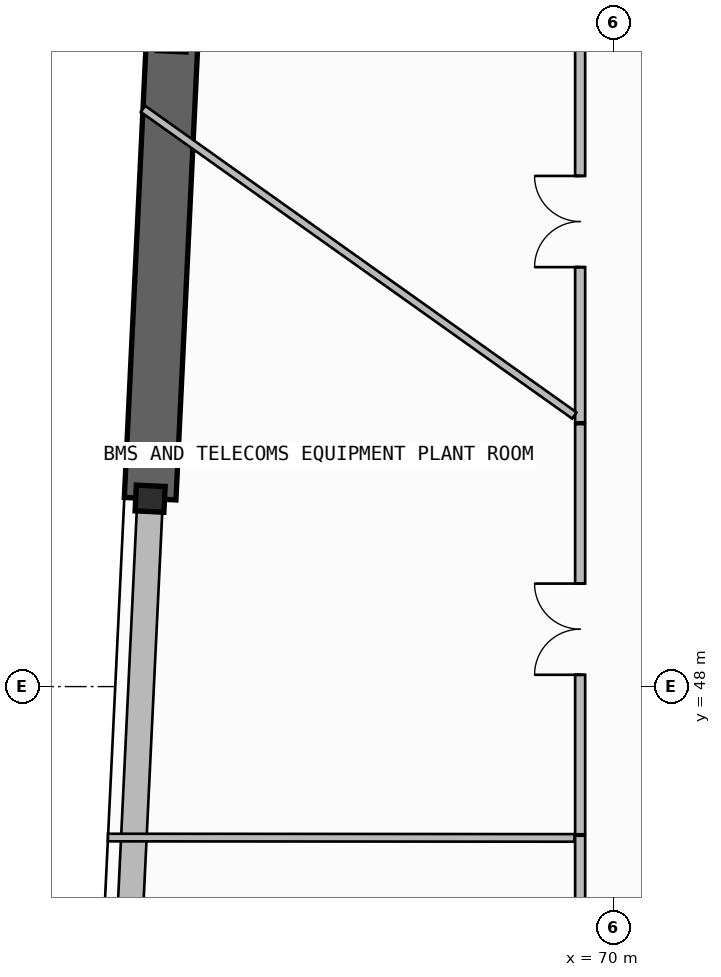
"""IFC4 building model, lengths in metres.
Left out: names, types, materials, properties, quantities, classifications, styles, units other than length and angle.
Written with IfcOpenShell. Run it as: python <this file> out.ifc"""

import sys

from ifc_helpers import new_model, si_unit, direction, frame, frame_2d, origin, origin_2d, place, context, subcontext, project, spatial, rectangle, i_section, extrude, element, fill, save


model = new_model("IFC4")
c1 = context("Model", 3, precision=1e-05, world=origin(), true_north=direction((0.0, 1.0)))
c2 = subcontext(c1, "Body", "Model", "MODEL_VIEW")
j1 = project(units=[si_unit("LENGTHUNIT", "METRE"), si_unit("PLANEANGLEUNIT", "RADIAN")], contexts=[c1])
p1 = place(None, origin())
s1 = spatial("IfcSite", under=j1, at=p1, CompositionType="ELEMENT")
p2 = place(p1, origin())
s2 = spatial("IfcBuilding", under=s1, at=p2, CompositionType="ELEMENT")
p3 = place(p2, frame((0.0, 0.0, 59.1)))
s3 = spatial("IfcBuildingStorey", under=s2, at=p3, CompositionType="ELEMENT", Elevation=59.1)
for number, where, z_axis, x_axis in (
    (1, (62.742, 58.659, 0.0), (0.0, 0.0, 1.0), (0.048, 0.999, 0.0)),
    (2, (62.378, 51.09, 0.0), (0.0, 0.0, 1.0), (0.048, 0.999, 0.0)),
):
    element("IfcColumn", number, at=place(p3, frame(where, z_axis=z_axis, x_axis=x_axis)), inside=s3, PredefinedType="COLUMN", context=c2, shape_type="SweptSolid", body=[
        extrude(i_section(OverallWidth=0.424, OverallDepth=0.474, WebThickness=0.048, FlangeThickness=0.077, FilletRadius=0.015, at=origin_2d()), origin(), (0.0, 0.0, 1.0), 4.2),
    ])
p4 = place(p3, frame((63.428, 72.957, -0.5), z_axis=(0.0, 0.0, 1.0), x_axis=(-0.047976309476, -0.998848473858, 0.0)))
e3 = element("IfcWall", 3, at=p4, inside=s3, PredefinedType="SHEAR", context=c2, shape_type="SweptSolid", body=[
    extrude(rectangle(XDim=21.892, YDim=0.85, at=frame_2d((10.946, 0.0))), origin(), (0.0, 0.0, 1.0), 4.3),
])
p5 = place(p3, frame((62.378, 51.09, 0.0), z_axis=(0.0, 0.0, 1.0), x_axis=(-0.047978424452, -0.99884837227, 0.0)))
e4 = element("IfcWall", 4, at=p5, inside=s3, PredefinedType="SOLIDWALL", context=c2, shape_type="SweptSolid", body=[
    extrude(rectangle(XDim=14.314, YDim=0.42, at=frame_2d((7.157, 0.0))), origin(), (0.0, 0.0, 1.0), 2.777),
])
p6 = place(p3, frame((94.513, 58.196, 0.0), z_axis=(0.0, 0.0, 1.0), x_axis=(-0.776001602097, 0.630730935933, 0.0)))
e5 = element("IfcWall", 5, at=p6, inside=s3, PredefinedType="PARAPET", context=c2, shape_type="SweptSolid", body=[
    extrude(rectangle(XDim=36.148, YDim=0.2, at=frame_2d((18.074, 0.0))), origin(), (0.0, 0.0, 1.0), 1.15),
])
p7 = place(p3, frame((69.45, 45.547, 0.0), z_axis=(0.0, 0.0, 1.0), x_axis=(0.0, -1.0, 0.0)))
e6 = element("IfcWall", 6, at=p7, inside=s3, PredefinedType="PARTITIONING", context=c2, shape_type="SweptSolid", body=[
    extrude(rectangle(XDim=6.788, YDim=0.165, at=frame_2d((3.394, 0.0))), origin(), (0.0, 0.0, 1.0), 3.8),
])
p8 = place(p7, frame((2.794, 0.0, 0.0)))
e7 = element("IfcOpeningElement", 7, at=p8, cuts=e6, PredefinedType="OPENING", context=c2, shape_type="SweptSolid", body=[
    extrude(rectangle(XDim=1.2, YDim=2.2, at=frame_2d((0.6, 1.1))), frame((0.0, 0.093, 0.0), z_axis=(0.0, -1.0, 0.0), x_axis=(1.0, 0.0, 0.0)), (0.0, 0.0, 1.0), 0.185),
])
p9 = place(p3, frame((61.685, 45.518, 0.0), z_axis=(0.0, 0.0, 1.0), x_axis=(0.999999657602, -0.000827524463, 0.0)))
e8 = element("IfcWall", 8, at=p9, inside=s3, PredefinedType="PARTITIONING", context=c2, shape_type="SweptSolid", body=[
    extrude(rectangle(XDim=7.671, YDim=0.125, at=frame_2d((3.835, 0.0))), origin(), (0.0, 0.0, 1.0), 3.8),
])
p10 = place(p3, frame((69.45, 58.95, 0.0), z_axis=(0.0, 0.0, 1.0), x_axis=(0.0, -1.0, 0.0)))
e9 = element("IfcWall", 9, at=p10, inside=s3, PredefinedType="PARTITIONING", context=c2, shape_type="SweptSolid", body=[
    extrude(rectangle(XDim=6.604, YDim=0.165, at=frame_2d((3.302, 0.0))), origin(), (0.0, 0.0, 1.0), 2.777),
])
p11 = place(p10, frame((2.552, 0.0, 0.0)))
e10 = element("IfcOpeningElement", 10, at=p11, cuts=e9, PredefinedType="OPENING", context=c2, shape_type="SweptSolid", body=[
    extrude(rectangle(XDim=1.5, YDim=2.25, at=frame_2d((0.75, 1.125))), frame((0.0, 0.093, 0.0), z_axis=(0.0, -1.0, 0.0), x_axis=(1.0, 0.0, 0.0)), (0.0, 0.0, 1.0), 0.185),
])
p12 = place(p3, frame((69.355, 52.458, 0.0), z_axis=(0.0, 0.0, 1.0), x_axis=(-0.815095714188, 0.579326312809, 0.0)))
e11 = element("IfcWall", 11, at=p12, inside=s3, PredefinedType="PARTITIONING", context=c2, shape_type="SweptSolid", body=[
    extrude(rectangle(XDim=8.704, YDim=0.125, at=frame_2d((4.352, 0.0))), origin(), (0.0, 0.0, 1.0), 2.777),
])
p13 = place(p3, frame((69.45, 52.316, 0.0), z_axis=(0.0, 0.0, 1.0), x_axis=(0.0, -1.0, 0.0)))
e12 = element("IfcWall", 12, at=p13, inside=s3, PredefinedType="PARTITIONING", context=c2, shape_type="SweptSolid", body=[
    extrude(rectangle(XDim=6.745, YDim=0.165, at=frame_2d((3.373, 0.0))), origin(), (0.0, 0.0, 1.0), 2.777),
])
p14 = place(p13, frame((2.623, 0.0, 0.0)))
e13 = element("IfcOpeningElement", 13, at=p14, cuts=e12, PredefinedType="OPENING", context=c2, shape_type="SweptSolid", body=[
    extrude(rectangle(XDim=1.5, YDim=2.25, at=frame_2d((0.75, 1.125))), frame((0.0, 0.093, 0.0), z_axis=(0.0, -1.0, 0.0), x_axis=(1.0, 0.0, 0.0)), (0.0, 0.0, 1.0), 0.185),
])
p15 = place(p11, frame((1.5, 0.0, 0.0), z_axis=(0.0, 0.0, 1.0), x_axis=(-1.0, 0.0, 0.0)))
e14 = element("IfcDoor", 14, at=p15, inside=s3, OperationType="DOUBLE_DOOR_SINGLE_SWING", PredefinedType="DOOR", context=c2, shape_type="SweptSolid", body=[
    extrude(rectangle(XDim=1.5, YDim=2.25, at=frame_2d((0.75, 1.125))), frame((0.0, 0.025, 0.0), z_axis=(0.0, -1.0, 0.0), x_axis=(1.0, 0.0, 0.0)), (0.0, 0.0, 1.0), 0.05),
])
fill(e10, e14)
p16 = place(p14, frame((1.5, 0.0, 0.0), z_axis=(0.0, 0.0, 1.0), x_axis=(-1.0, 0.0, 0.0)))
e15 = element("IfcDoor", 15, at=p16, inside=s3, OperationType="DOUBLE_DOOR_SINGLE_SWING", PredefinedType="DOOR", context=c2, shape_type="SweptSolid", body=[
    extrude(rectangle(XDim=1.5, YDim=2.25, at=frame_2d((0.75, 1.125))), frame((0.0, 0.025, 0.0), z_axis=(0.0, -1.0, 0.0), x_axis=(1.0, 0.0, 0.0)), (0.0, 0.0, 1.0), 0.05),
])
fill(e13, e15)
save(model, sys.argv[1])
